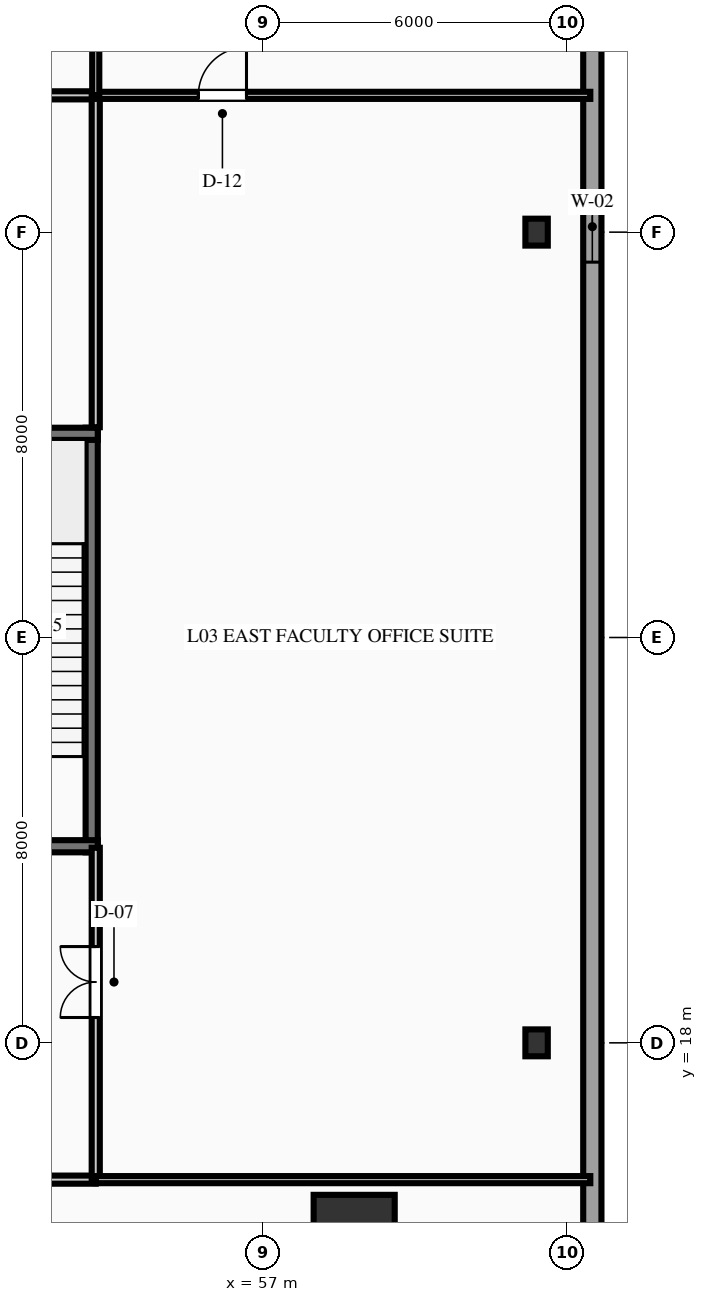
"""IFC4 building model, lengths in metres.
Left out: names, types, materials, properties, quantities, classifications, styles, units other than length and angle.
Written with IfcOpenShell. Run it as: python <this file> out.ifc"""

import sys

from ifc_helpers import new_model, si_unit, direction, frame, frame_2d, origin, origin_2d, place, context, subcontext, project, spatial, rectangle, hollow_rectangle, i_section, extrude, element, fill, save


model = new_model("IFC4")
c1 = context("Model", 3, precision=1e-05, world=origin(), true_north=direction((0.0, 1.0)))
c2 = subcontext(c1, "Body", "Model", "MODEL_VIEW")
j1 = project(units=[si_unit("LENGTHUNIT", "METRE"), si_unit("PLANEANGLEUNIT", "RADIAN")], contexts=[c1])
p1 = place(None, origin())
s1 = spatial("IfcSite", under=j1, at=p1, CompositionType="ELEMENT")
p2 = place(p1, origin())
s2 = spatial("IfcBuilding", under=s1, at=p2, CompositionType="ELEMENT")
p3 = place(p2, frame((0.0, 0.0, 16.8)))
s3 = spatial("IfcBuildingStorey", under=s2, at=p3, CompositionType="ELEMENT", Elevation=16.8)
p4 = place(p3, frame((53.62, 21.76, 0.0), z_axis=(0.0, 0.0, 1.0), x_axis=(0.0, 1.0, 0.0)))
e1 = element("IfcWall", 1, at=p4, inside=s3, PredefinedType="SHEAR", context=c2, shape_type="SweptSolid", body=[
    extrude(rectangle(XDim=8.38, YDim=0.24, at=frame_2d((4.19, 0.0))), origin(), (0.0, 0.0, 1.0), 5.4),
])
p5 = place(p3, frame((49.76, 21.88, 0.0), z_axis=(0.0, 0.0, 1.0), x_axis=(1.0, 0.0, 0.0)))
e2 = element("IfcWall", 2, at=p5, inside=s3, PredefinedType="SHEAR", context=c2, shape_type="SweptSolid", body=[
    extrude(rectangle(XDim=3.98, YDim=0.24, at=frame_2d((1.99, 0.0))), origin(), (0.0, 0.0, 1.0), 5.4),
])
p6 = place(p5, frame((1.465, 0.0, 0.0)))
e3 = element("IfcOpeningElement", 3, at=p6, cuts=e2, PredefinedType="OPENING", context=c2, shape_type="SweptSolid", body=[
    extrude(rectangle(XDim=1.05, YDim=2.15, at=frame_2d((0.525, 1.075))), frame((0.0, 0.13, 0.0), z_axis=(0.0, -1.0, 0.0), x_axis=(1.0, 0.0, 0.0)), (0.0, 0.0, 1.0), 0.26),
])
p7 = place(p3, frame((49.76, 30.02, 0.0), z_axis=(0.0, 0.0, 1.0), x_axis=(1.0, 0.0, 0.0)))
e4 = element("IfcWall", 4, at=p7, inside=s3, PredefinedType="SHEAR", context=c2, shape_type="SweptSolid", body=[
    extrude(rectangle(XDim=3.98, YDim=0.24, at=frame_2d((1.99, 0.0))), origin(), (0.0, 0.0, 1.0), 5.4),
])
p8 = place(p3, frame((58.8, 14.2, 0.0), z_axis=(0.0, 0.0, 1.0), x_axis=(1.0, 0.0, 0.0)))
e5 = element("IfcColumn", 5, at=p8, inside=s3, PredefinedType="COLUMN", context=c2, shape_type="SweptSolid", body=[
    extrude(hollow_rectangle(XDim=1.6, YDim=1.6, WallThickness=0.08, at=origin_2d()), origin(), (0.0, 0.0, 1.0), 5.4),
])
for number, where, z_axis, x_axis in (
    (6, (62.4, 18.0, 0.0), (0.0, 0.0, 1.0), (1.0, 0.0, 0.0)),
    (7, (62.4, 34.0, 0.0), (0.0, 0.0, 1.0), (1.0, 0.0, 0.0)),
):
    element("IfcColumn", number, at=place(p3, frame(where, z_axis=z_axis, x_axis=x_axis)), inside=s3, PredefinedType="COLUMN", context=c2, shape_type="SweptSolid", body=[
        extrude(i_section(OverallWidth=0.442, OverallDepth=0.531, WebThickness=0.066, FlangeThickness=0.106, at=origin_2d()), origin(), (0.0, 0.0, 1.0), 5.4),
    ])
p9 = place(p3, frame((63.5, 43.6, 0.0), z_axis=(0.0, 0.0, 1.0), x_axis=(0.0, -1.0, 0.0)))
e8 = element("IfcWall", 8, at=p9, inside=s3, PredefinedType="STANDARD", context=c2, shape_type="SweptSolid", body=[
    extrude(rectangle(XDim=31.4, YDim=0.36, at=frame_2d((15.7, 0.0))), origin(), (0.0, 0.0, 1.0), 4.98),
])
p10 = place(p9, frame((8.792, 0.0, 1.0)))
e9 = element("IfcOpeningElement", 9, at=p10, cuts=e8, PredefinedType="OPENING", context=c2, shape_type="SweptSolid", body=[
    extrude(rectangle(XDim=1.4, YDim=2.2, at=frame_2d((0.7, 1.1))), frame((0.0, 0.19, 0.0), z_axis=(0.0, -1.0, 0.0), x_axis=(1.0, 0.0, 0.0)), (0.0, 0.0, 1.0), 0.38),
])
p11 = place(p3, frame((18.3, 15.3, 0.0), z_axis=(0.0, 0.0, 1.0), x_axis=(1.0, 0.0, 0.0)))
e10 = element("IfcWall", 10, at=p11, inside=s3, PredefinedType="PARTITIONING", context=c2, shape_type="SweptSolid", body=[
    extrude(rectangle(XDim=35.4, YDim=0.16, at=frame_2d((17.7, 0.0))), origin(), (0.0, 0.0, 1.0), 4.202),
])
p12 = place(p11, frame((6.525, 0.0, 0.0)))
e11 = element("IfcOpeningElement", 11, at=p12, cuts=e10, PredefinedType="OPENING", context=c2, shape_type="SweptSolid", body=[
    extrude(rectangle(XDim=1.05, YDim=2.15, at=frame_2d((0.525, 1.075))), frame((0.0, 0.09, 0.0), z_axis=(0.0, -1.0, 0.0), x_axis=(1.0, 0.0, 0.0)), (0.0, 0.0, 1.0), 0.18),
])
p13 = place(p11, frame((16.7, 0.0, 0.0)))
e12 = element("IfcOpeningElement", 12, at=p13, cuts=e10, PredefinedType="OPENING", context=c2, shape_type="SweptSolid", body=[
    extrude(rectangle(XDim=1.4, YDim=2.2, at=frame_2d((0.7, 1.1))), frame((0.0, 0.09, 0.0), z_axis=(0.0, -1.0, 0.0), x_axis=(1.0, 0.0, 0.0)), (0.0, 0.0, 1.0), 0.18),
])
p14 = place(p11, frame((27.525, 0.0, 0.0)))
e13 = element("IfcOpeningElement", 13, at=p14, cuts=e10, PredefinedType="OPENING", context=c2, shape_type="SweptSolid", body=[
    extrude(rectangle(XDim=1.05, YDim=2.15, at=frame_2d((0.525, 1.075))), frame((0.0, 0.09, 0.0), z_axis=(0.0, -1.0, 0.0), x_axis=(1.0, 0.0, 0.0)), (0.0, 0.0, 1.0), 0.18),
])
p15 = place(p3, frame((18.3, 36.7, 0.0), z_axis=(0.0, 0.0, 1.0), x_axis=(1.0, 0.0, 0.0)))
e14 = element("IfcWall", 14, at=p15, inside=s3, PredefinedType="PARTITIONING", context=c2, shape_type="SweptSolid", body=[
    extrude(rectangle(XDim=35.4, YDim=0.16, at=frame_2d((17.7, 0.0))), origin(), (0.0, 0.0, 1.0), 4.98),
])
p16 = place(p15, frame((4.125, 0.0, 0.0)))
e15 = element("IfcOpeningElement", 15, at=p16, cuts=e14, PredefinedType="OPENING", context=c2, shape_type="SweptSolid", body=[
    extrude(rectangle(XDim=1.05, YDim=2.15, at=frame_2d((0.525, 1.075))), frame((0.0, 0.09, 0.0), z_axis=(0.0, -1.0, 0.0), x_axis=(1.0, 0.0, 0.0)), (0.0, 0.0, 1.0), 0.18),
])
p17 = place(p15, frame((16.375, 0.0, 0.0)))
e16 = element("IfcOpeningElement", 16, at=p17, cuts=e14, PredefinedType="OPENING", context=c2, shape_type="SweptSolid", body=[
    extrude(rectangle(XDim=1.05, YDim=2.15, at=frame_2d((0.525, 1.075))), frame((0.0, 0.09, 0.0), z_axis=(0.0, -1.0, 0.0), x_axis=(1.0, 0.0, 0.0)), (0.0, 0.0, 1.0), 0.18),
])
p18 = place(p15, frame((27.225, 0.0, 0.0)))
e17 = element("IfcOpeningElement", 17, at=p18, cuts=e14, PredefinedType="OPENING", context=c2, shape_type="SweptSolid", body=[
    extrude(rectangle(XDim=0.95, YDim=2.15, at=frame_2d((0.475, 1.075))), frame((0.0, 0.09, 0.0), z_axis=(0.0, -1.0, 0.0), x_axis=(1.0, 0.0, 0.0)), (0.0, 0.0, 1.0), 0.18),
])
p19 = place(p15, frame((30.275, 0.0, 0.0)))
e18 = element("IfcOpeningElement", 18, at=p19, cuts=e14, PredefinedType="OPENING", context=c2, shape_type="SweptSolid", body=[
    extrude(rectangle(XDim=0.95, YDim=2.15, at=frame_2d((0.475, 1.075))), frame((0.0, 0.09, 0.0), z_axis=(0.0, -1.0, 0.0), x_axis=(1.0, 0.0, 0.0)), (0.0, 0.0, 1.0), 0.18),
])
p20 = place(p15, frame((33.3, 0.0, 0.0)))
e19 = element("IfcOpeningElement", 19, at=p20, cuts=e14, PredefinedType="OPENING", context=c2, shape_type="SweptSolid", body=[
    extrude(rectangle(XDim=1.0, YDim=2.15, at=frame_2d((0.5, 1.075))), frame((0.0, 0.09, 0.0), z_axis=(0.0, -1.0, 0.0), x_axis=(1.0, 0.0, 0.0)), (0.0, 0.0, 1.0), 0.18),
])
p21 = place(p3, frame((53.7, 15.3, 0.0), z_axis=(0.0, 0.0, 1.0), x_axis=(0.0, 1.0, 0.0)))
e20 = element("IfcWall", 20, at=p21, inside=s3, PredefinedType="PARTITIONING", context=c2, shape_type="SweptSolid", body=[
    extrude(rectangle(XDim=6.55, YDim=0.16, at=frame_2d((3.275, 0.0))), origin(), (0.0, 0.0, 1.0), 4.98),
])
p22 = place(p21, frame((3.2, 0.0, 0.0)))
e21 = element("IfcOpeningElement", 21, at=p22, cuts=e20, PredefinedType="OPENING", context=c2, shape_type="SweptSolid", body=[
    extrude(rectangle(XDim=1.4, YDim=2.2, at=frame_2d((0.7, 1.1))), frame((0.0, 0.09, 0.0), z_axis=(0.0, -1.0, 0.0), x_axis=(1.0, 0.0, 0.0)), (0.0, 0.0, 1.0), 0.18),
])
p23 = place(p3, frame((53.7, 30.15, 0.0), z_axis=(0.0, 0.0, 1.0), x_axis=(0.0, 1.0, 0.0)))
e22 = element("IfcWall", 22, at=p23, inside=s3, PredefinedType="PARTITIONING", context=c2, shape_type="SweptSolid", body=[
    extrude(rectangle(XDim=6.55, YDim=0.16, at=frame_2d((3.275, 0.0))), origin(), (0.0, 0.0, 1.0), 4.98),
])
p24 = place(p3, frame((53.7, 15.3, 0.0), z_axis=(0.0, 0.0, 1.0), x_axis=(1.0, 0.0, 0.0)))
e23 = element("IfcWall", 23, at=p24, inside=s3, PredefinedType="PARTITIONING", context=c2, shape_type="SweptSolid", body=[
    extrude(rectangle(XDim=9.76, YDim=0.14, at=frame_2d((4.88, 0.0))), origin(), (0.0, 0.0, 1.0), 4.202),
])
p25 = place(p3, frame((53.7, 36.7, 0.0), z_axis=(0.0, 0.0, 1.0), x_axis=(1.0, 0.0, 0.0)))
e24 = element("IfcWall", 24, at=p25, inside=s3, PredefinedType="PARTITIONING", context=c2, shape_type="SweptSolid", body=[
    extrude(rectangle(XDim=9.76, YDim=0.14, at=frame_2d((4.88, 0.0))), origin(), (0.0, 0.0, 1.0), 4.98),
])
p26 = place(p25, frame((2.025, 0.0, 0.0)))
e25 = element("IfcOpeningElement", 25, at=p26, cuts=e24, PredefinedType="OPENING", context=c2, shape_type="SweptSolid", body=[
    extrude(rectangle(XDim=0.95, YDim=2.15, at=frame_2d((0.475, 1.075))), frame((0.0, 0.08, 0.0), z_axis=(0.0, -1.0, 0.0), x_axis=(1.0, 0.0, 0.0)), (0.0, 0.0, 1.0), 0.16),
])
p27 = place(p3, frame((53.7, 36.7, 0.0), z_axis=(0.0, 0.0, 1.0), x_axis=(0.0, 1.0, 0.0)))
e26 = element("IfcWall", 26, at=p27, inside=s3, PredefinedType="PARTITIONING", context=c2, shape_type="SweptSolid", body=[
    extrude(rectangle(XDim=10.06, YDim=0.14, at=frame_2d((5.03, 0.0))), origin(), (0.0, 0.0, 1.0), 4.98),
])
p28 = place(p10, origin())
e27 = element("IfcWindow", 27, at=p28, inside=s3, PartitioningType="SINGLE_PANEL", PredefinedType="WINDOW", context=c2, shape_type="SweptSolid", body=[
    extrude(rectangle(XDim=1.4, YDim=2.2, at=frame_2d((0.7, 1.1))), frame((0.0, 0.03, 0.0), z_axis=(0.0, -1.0, 0.0), x_axis=(1.0, 0.0, 0.0)), (0.0, 0.0, 1.0), 0.06),
])
fill(e9, e27)
p29 = place(p22, origin())
e28 = element("IfcDoor", 28, at=p29, inside=s3, OperationType="DOUBLE_DOOR_SINGLE_SWING", PredefinedType="DOOR", context=c2, shape_type="SweptSolid", body=[
    extrude(rectangle(XDim=1.4, YDim=2.2, at=frame_2d((0.7, 1.1))), frame((0.0, 0.025, 0.0), z_axis=(0.0, -1.0, 0.0), x_axis=(1.0, 0.0, 0.0)), (0.0, 0.0, 1.0), 0.05),
])
fill(e21, e28)
p30 = place(p26, origin())
e29 = element("IfcDoor", 29, at=p30, inside=s3, OperationType="SINGLE_SWING_RIGHT", PredefinedType="DOOR", context=c2, shape_type="SweptSolid", body=[
    extrude(rectangle(XDim=0.95, YDim=2.15, at=frame_2d((0.475, 1.075))), frame((0.0, 0.025, 0.0), z_axis=(0.0, -1.0, 0.0), x_axis=(1.0, 0.0, 0.0)), (0.0, 0.0, 1.0), 0.05),
])
fill(e25, e29)
save(model, sys.argv[1])
